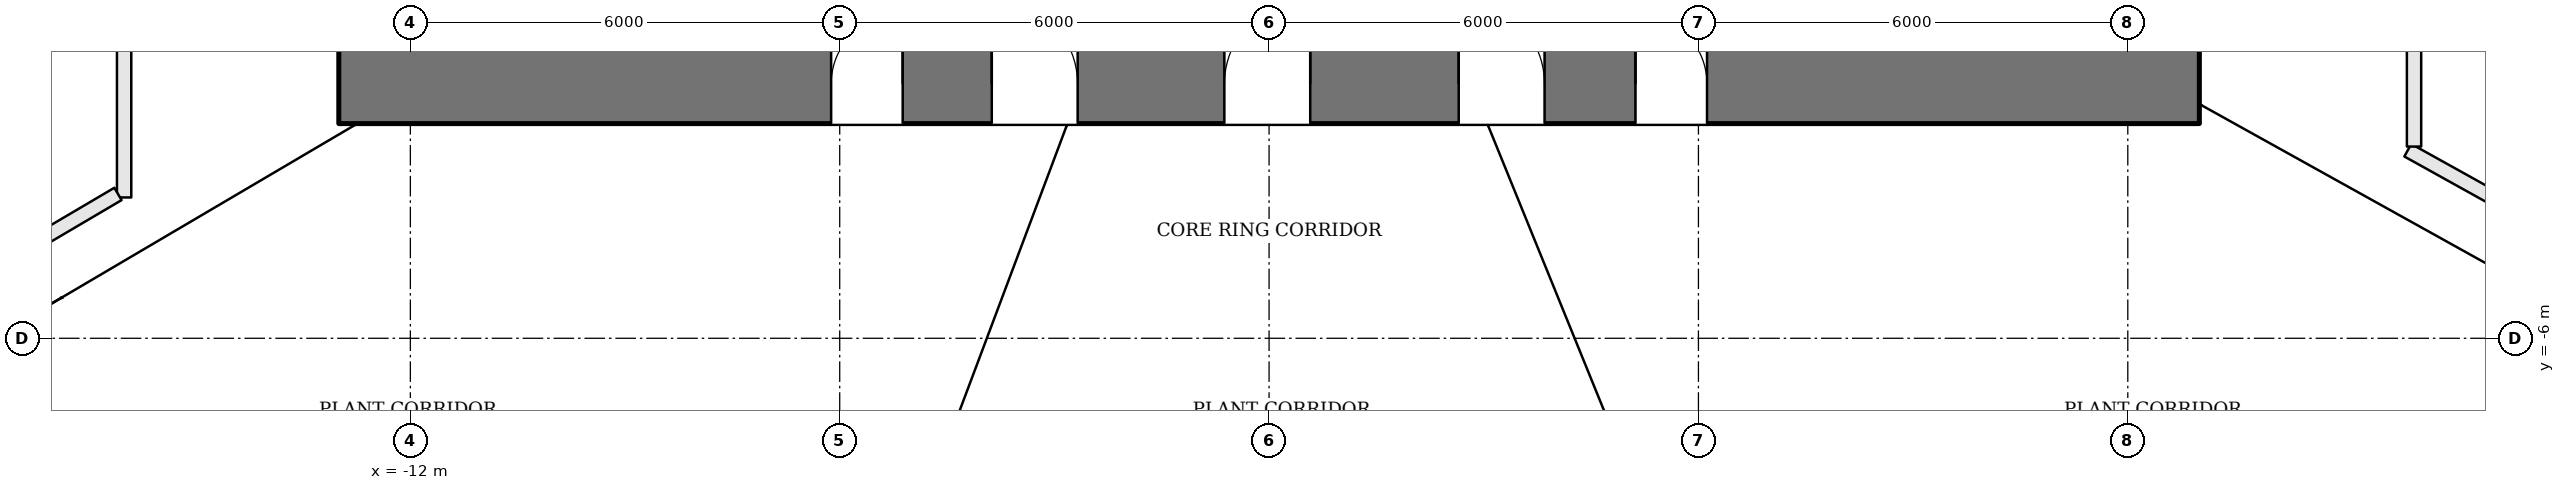
"""IFC4 building model, lengths in metres.
Left out: names, types, materials, properties, quantities, classifications, styles, units other than length and angle.
Written with IfcOpenShell. Run it as: python <this file> out.ifc"""

import sys

from ifc_helpers import new_model, si_unit, direction, frame, frame_2d, origin, place, context, subcontext, project, spatial, rectangle, extrude, element, fill, save


model = new_model("IFC4")
c1 = context("Model", 3, precision=1e-05, world=origin(), true_north=direction((0.0, 1.0)))
c2 = subcontext(c1, "Body", "Model", "MODEL_VIEW")
j1 = project(units=[si_unit("LENGTHUNIT", "METRE"), si_unit("PLANEANGLEUNIT", "RADIAN")], contexts=[c1])
p1 = place(None, origin())
s1 = spatial("IfcSite", under=j1, at=p1, CompositionType="ELEMENT")
p2 = place(p1, origin())
s2 = spatial("IfcBuilding", under=s1, at=p2, CompositionType="ELEMENT")
p3 = place(p2, frame((0.0, 0.0, 121.2)))
s3 = spatial("IfcBuildingStorey", under=s2, at=p3, CompositionType="ELEMENT", Elevation=121.2)
p4 = place(p3, frame((-13.0, -2.45, 0.0), z_axis=(0.0, 0.0, 1.0), x_axis=(1.0, 0.0, 0.0)))
e1 = element("IfcWall", 1, at=p4, inside=s3, PredefinedType="SHEAR", context=c2, shape_type="SweptSolid", body=[
    extrude(rectangle(XDim=26.0, YDim=1.1, at=frame_2d((13.0, 0.0))), origin(), (0.0, 0.0, 1.0), 4.5),
])
p5 = place(p4, frame((9.125, 0.0, 0.0)))
e2 = element("IfcOpeningElement", 2, at=p5, cuts=e1, PredefinedType="OPENING", context=c2, shape_type="SweptSolid", body=[
    extrude(rectangle(XDim=1.2, YDim=2.1, at=frame_2d((0.6, 1.05))), frame((0.0, 0.56, 0.0), z_axis=(0.0, -1.0, 0.0), x_axis=(1.0, 0.0, 0.0)), (0.0, 0.0, 1.0), 1.12),
])
p6 = place(p4, frame((12.375, 0.0, 0.0)))
e3 = element("IfcOpeningElement", 3, at=p6, cuts=e1, PredefinedType="OPENING", context=c2, shape_type="SweptSolid", body=[
    extrude(rectangle(XDim=1.2, YDim=2.1, at=frame_2d((0.6, 1.05))), frame((0.0, 0.56, 0.0), z_axis=(0.0, -1.0, 0.0), x_axis=(1.0, 0.0, 0.0)), (0.0, 0.0, 1.0), 1.12),
])
p7 = place(p4, frame((15.65, 0.0, 0.0)))
e4 = element("IfcOpeningElement", 4, at=p7, cuts=e1, PredefinedType="OPENING", context=c2, shape_type="SweptSolid", body=[
    extrude(rectangle(XDim=1.2, YDim=2.1, at=frame_2d((0.6, 1.05))), frame((0.0, 0.56, 0.0), z_axis=(0.0, -1.0, 0.0), x_axis=(1.0, 0.0, 0.0)), (0.0, 0.0, 1.0), 1.12),
])
p8 = place(p4, frame((6.88, 0.0, 0.0)))
e5 = element("IfcOpeningElement", 5, at=p8, cuts=e1, PredefinedType="OPENING", context=c2, shape_type="SweptSolid", body=[
    extrude(rectangle(XDim=1.0, YDim=2.1, at=frame_2d((0.5, 1.05))), frame((0.0, 0.56, 0.0), z_axis=(0.0, -1.0, 0.0), x_axis=(1.0, 0.0, 0.0)), (0.0, 0.0, 1.0), 1.12),
])
p9 = place(p4, frame((18.12, 0.0, 0.0)))
e6 = element("IfcOpeningElement", 6, at=p9, cuts=e1, PredefinedType="OPENING", context=c2, shape_type="SweptSolid", body=[
    extrude(rectangle(XDim=1.0, YDim=2.1, at=frame_2d((0.5, 1.05))), frame((0.0, 0.56, 0.0), z_axis=(0.0, -1.0, 0.0), x_axis=(1.0, 0.0, 0.0)), (0.0, 0.0, 1.0), 1.12),
])
p10 = place(p3, frame((-16.0, 5.969, 0.0), z_axis=(0.0, 0.0, 1.0), x_axis=(0.0, -1.0, 0.0)))
e7 = element("IfcWall", 7, at=p10, inside=s3, PredefinedType="PARTITIONING", context=c2, shape_type="SweptSolid", body=[
    extrude(rectangle(XDim=10.001, YDim=0.2, at=frame_2d((5.0, 0.0))), origin(), (0.0, 0.0, 1.0), 4.3),
])
p11 = place(p10, frame((3.534, 0.0, 0.0)))
e8 = element("IfcOpeningElement", 8, at=p11, cuts=e7, PredefinedType="OPENING", context=c2, shape_type="SweptSolid", body=[
    extrude(rectangle(XDim=1.8, YDim=2.1, at=frame_2d((0.9, 1.05))), frame((0.0, 0.11, 0.0), z_axis=(0.0, -1.0, 0.0), x_axis=(1.0, 0.0, 0.0)), (0.0, 0.0, 1.0), 0.22),
])
p12 = place(p3, frame((-16.086, -3.983, 0.0), z_axis=(0.0, 0.0, 1.0), x_axis=(-0.861769442787, -0.5073001355, 0.0)))
e9 = element("IfcWall", 9, at=p12, inside=s3, PredefinedType="PARTITIONING", context=c2, shape_type="SweptSolid", body=[
    extrude(rectangle(XDim=4.077, YDim=0.2, at=frame_2d((2.038, 0.0))), origin(), (0.0, 0.0, 1.0), 4.3),
])
p13 = place(p3, frame((20.118, -5.709, 0.0), z_axis=(0.0, 0.0, 1.0), x_axis=(-0.874078265919, 0.4857851223, 0.0)))
e10 = element("IfcWall", 10, at=p13, inside=s3, PredefinedType="PARTITIONING", context=c2, shape_type="SweptSolid", body=[
    extrude(rectangle(XDim=4.811, YDim=0.2, at=frame_2d((2.405, 0.0))), origin(), (0.0, 0.0, 1.0), 4.3),
])
p14 = place(p3, frame((16.0, -3.321, 0.0), z_axis=(0.0, 0.0, 1.0), x_axis=(0.0, 1.0, 0.0)))
e11 = element("IfcWall", 11, at=p14, inside=s3, PredefinedType="PARTITIONING", context=c2, shape_type="SweptSolid", body=[
    extrude(rectangle(XDim=9.924, YDim=0.2, at=frame_2d((4.962, 0.0))), origin(), (0.0, 0.0, 1.0), 4.3),
])
p15 = place(p14, frame((4.173, 0.0, 0.0)))
e12 = element("IfcOpeningElement", 12, at=p15, cuts=e11, PredefinedType="OPENING", context=c2, shape_type="SweptSolid", body=[
    extrude(rectangle(XDim=1.8, YDim=2.1, at=frame_2d((0.9, 1.05))), frame((0.0, 0.11, 0.0), z_axis=(0.0, -1.0, 0.0), x_axis=(1.0, 0.0, 0.0)), (0.0, 0.0, 1.0), 0.22),
])
p16 = place(p5, origin())
e13 = element("IfcDoor", 13, at=p16, inside=s3, OperationType="SINGLE_SWING_LEFT", PredefinedType="DOOR", context=c2, shape_type="SweptSolid", body=[
    extrude(rectangle(XDim=1.2, YDim=2.1, at=frame_2d((0.6, 1.05))), frame((0.0, 0.025, 0.0), z_axis=(0.0, -1.0, 0.0), x_axis=(1.0, 0.0, 0.0)), (0.0, 0.0, 1.0), 0.05),
])
fill(e2, e13)
p17 = place(p6, origin())
e14 = element("IfcDoor", 14, at=p17, inside=s3, OperationType="SINGLE_SWING_RIGHT", PredefinedType="DOOR", context=c2, shape_type="SweptSolid", body=[
    extrude(rectangle(XDim=1.2, YDim=2.1, at=frame_2d((0.6, 1.05))), frame((0.0, 0.025, 0.0), z_axis=(0.0, -1.0, 0.0), x_axis=(1.0, 0.0, 0.0)), (0.0, 0.0, 1.0), 0.05),
])
fill(e3, e14)
p18 = place(p7, origin())
e15 = element("IfcDoor", 15, at=p18, inside=s3, OperationType="SINGLE_SWING_LEFT", PredefinedType="DOOR", context=c2, shape_type="SweptSolid", body=[
    extrude(rectangle(XDim=1.2, YDim=2.1, at=frame_2d((0.6, 1.05))), frame((0.0, 0.025, 0.0), z_axis=(0.0, -1.0, 0.0), x_axis=(1.0, 0.0, 0.0)), (0.0, 0.0, 1.0), 0.05),
])
fill(e4, e15)
p19 = place(p8, origin())
e16 = element("IfcDoor", 16, at=p19, inside=s3, OperationType="SINGLE_SWING_RIGHT", PredefinedType="DOOR", context=c2, shape_type="SweptSolid", body=[
    extrude(rectangle(XDim=1.0, YDim=2.1, at=frame_2d((0.5, 1.05))), frame((0.0, 0.025, 0.0), z_axis=(0.0, -1.0, 0.0), x_axis=(1.0, 0.0, 0.0)), (0.0, 0.0, 1.0), 0.05),
])
fill(e5, e16)
p20 = place(p9, origin())
e17 = element("IfcDoor", 17, at=p20, inside=s3, OperationType="SINGLE_SWING_LEFT", PredefinedType="DOOR", context=c2, shape_type="SweptSolid", body=[
    extrude(rectangle(XDim=1.0, YDim=2.1, at=frame_2d((0.5, 1.05))), frame((0.0, 0.025, 0.0), z_axis=(0.0, -1.0, 0.0), x_axis=(1.0, 0.0, 0.0)), (0.0, 0.0, 1.0), 0.05),
])
fill(e6, e17)
save(model, sys.argv[1])
